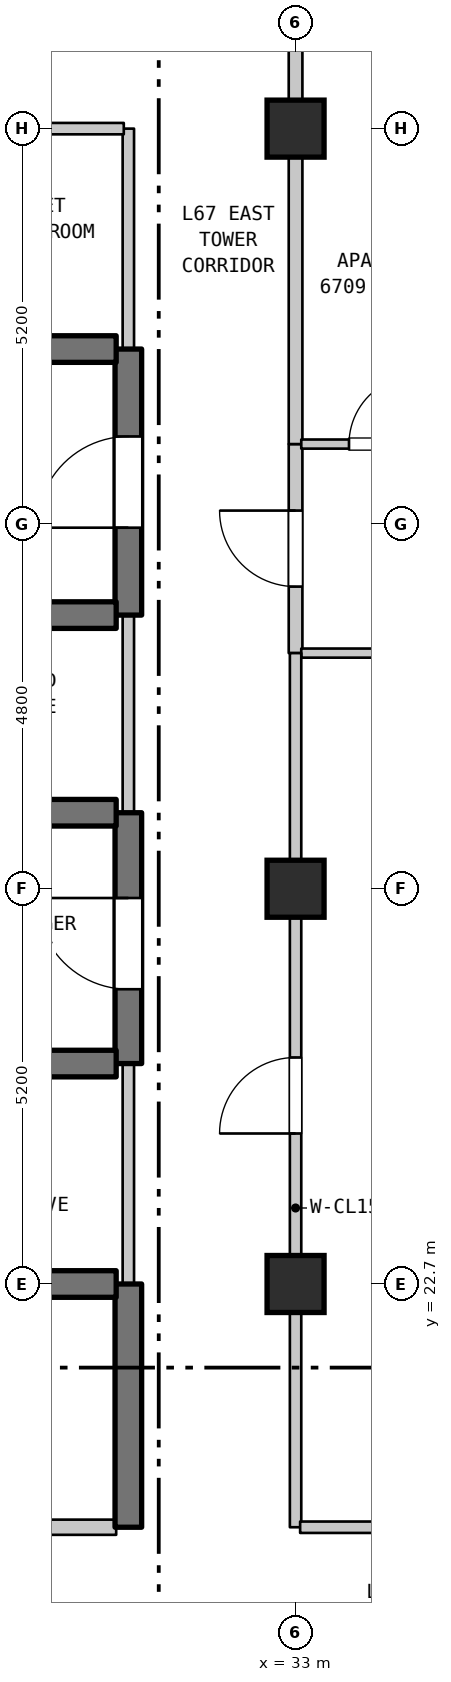
"""IFC4 building model, lengths in metres.
Left out: names, types, materials, properties, quantities, classifications, styles, units other than length and angle.
Written with IfcOpenShell. Run it as: python <this file> out.ifc"""

import sys

from ifc_helpers import new_model, si_unit, direction, frame, frame_2d, origin, origin_2d, place, context, subcontext, project, spatial, rectangle, extrude, element, fill, save


model = new_model("IFC4")
c1 = context("Model", 3, precision=1e-05, world=origin(), true_north=direction((0.0, 1.0)))
c2 = subcontext(c1, "Body", "Model", "MODEL_VIEW")
j1 = project(units=[si_unit("LENGTHUNIT", "METRE"), si_unit("PLANEANGLEUNIT", "RADIAN")], contexts=[c1])
p1 = place(None, origin())
s1 = spatial("IfcSite", under=j1, at=p1, CompositionType="ELEMENT")
p2 = place(p1, origin())
s2 = spatial("IfcBuilding", under=s1, at=p2, CompositionType="ELEMENT")
p3 = place(p2, frame((0.0, 0.0, 269.5)))
s3 = spatial("IfcBuildingStorey", under=s2, at=p3, CompositionType="ELEMENT", Elevation=269.5)
for number, where, z_axis, x_axis in (
    (1, (33.0, 22.7, 0.0), (0.0, 0.0, 1.0), (1.0, 0.0, 0.0)),
    (2, (33.0, 27.9, 0.0), (0.0, 0.0, 1.0), (1.0, 0.0, 0.0)),
    (3, (33.0, 37.9, 0.0), (0.0, 0.0, 1.0), (1.0, 0.0, 0.0)),
):
    element("IfcColumn", number, at=place(p3, frame(where, z_axis=z_axis, x_axis=x_axis)), inside=s3, PredefinedType="COLUMN", context=c2, shape_type="SweptSolid", body=[
        extrude(rectangle(XDim=0.75, YDim=0.75, at=origin_2d()), origin(), (0.0, 0.0, 1.0), 3.7),
    ])
p4 = place(p3, frame((30.8, 19.5, 0.0), z_axis=(0.0, 0.0, 1.0), x_axis=(0.0, 1.0, 0.0)))
e4 = element("IfcWall", 4, at=p4, inside=s3, PredefinedType="SHEAR", context=c2, shape_type="SweptSolid", body=[
    extrude(rectangle(XDim=3.2, YDim=0.35, at=frame_2d((1.6, 0.0))), origin(), (0.0, 0.0, 1.0), 3.39),
])
p5 = place(p3, frame((30.8, 22.7, 0.0), z_axis=(0.0, 0.0, 1.0), x_axis=(0.0, 1.0, 0.0)))
e5 = element("IfcWall", 5, at=p5, inside=s3, PredefinedType="STANDARD", context=c2, shape_type="SweptSolid", body=[
    extrude(rectangle(XDim=2.9, YDim=0.15, at=frame_2d((1.45, 0.0))), origin(), (0.0, 0.0, 1.0), 3.39),
])
p6 = place(p3, frame((30.8, 25.6, 0.0), z_axis=(0.0, 0.0, 1.0), x_axis=(0.0, 1.0, 0.0)))
e6 = element("IfcWall", 6, at=p6, inside=s3, PredefinedType="SHEAR", context=c2, shape_type="SweptSolid", body=[
    extrude(rectangle(XDim=3.3, YDim=0.35, at=frame_2d((1.65, 0.0))), origin(), (0.0, 0.0, 1.0), 3.39),
])
p7 = place(p6, frame((0.978, 0.0, 0.0)))
e7 = element("IfcOpeningElement", 7, at=p7, cuts=e6, PredefinedType="OPENING", context=c2, shape_type="SweptSolid", body=[
    extrude(rectangle(XDim=1.2, YDim=2.2, at=frame_2d((0.6, 1.1))), frame((0.0, 0.185, 0.0), z_axis=(0.0, -1.0, 0.0), x_axis=(1.0, 0.0, 0.0)), (0.0, 0.0, 1.0), 0.37),
])
p8 = place(p3, frame((30.8, 28.9, 0.0), z_axis=(0.0, 0.0, 1.0), x_axis=(0.0, 1.0, 0.0)))
e8 = element("IfcWall", 8, at=p8, inside=s3, PredefinedType="STANDARD", context=c2, shape_type="SweptSolid", body=[
    extrude(rectangle(XDim=2.6, YDim=0.15, at=frame_2d((1.3, 0.0))), origin(), (0.0, 0.0, 1.0), 3.39),
])
p9 = place(p3, frame((30.8, 31.5, 0.0), z_axis=(0.0, 0.0, 1.0), x_axis=(0.0, 1.0, 0.0)))
e9 = element("IfcWall", 9, at=p9, inside=s3, PredefinedType="SHEAR", context=c2, shape_type="SweptSolid", body=[
    extrude(rectangle(XDim=3.5, YDim=0.35, at=frame_2d((1.75, 0.0))), origin(), (0.0, 0.0, 1.0), 3.39),
])
p10 = place(p9, frame((1.15, 0.0, 0.0)))
e10 = element("IfcOpeningElement", 10, at=p10, cuts=e9, PredefinedType="OPENING", context=c2, shape_type="SweptSolid", body=[
    extrude(rectangle(XDim=1.2, YDim=2.2, at=frame_2d((0.6, 1.1))), frame((0.0, 0.185, 0.0), z_axis=(0.0, -1.0, 0.0), x_axis=(1.0, 0.0, 0.0)), (0.0, 0.0, 1.0), 0.37),
])
p11 = place(p3, frame((30.8, 35.0, 0.0), z_axis=(0.0, 0.0, 1.0), x_axis=(0.0, 1.0, 0.0)))
e11 = element("IfcWall", 11, at=p11, inside=s3, PredefinedType="STANDARD", context=c2, shape_type="SweptSolid", body=[
    extrude(rectangle(XDim=2.9, YDim=0.15, at=frame_2d((1.45, 0.0))), origin(), (0.0, 0.0, 1.0), 3.39),
])
p12 = place(p3, frame((33.0, 19.5, 0.0), z_axis=(0.0, 0.0, 1.0), x_axis=(0.0, 1.0, 0.0)))
e12 = element("IfcWall", 12, at=p12, inside=s3, PredefinedType="STANDARD", context=c2, shape_type="SweptSolid", body=[
    extrude(rectangle(XDim=8.4, YDim=0.15, at=frame_2d((4.2, 0.0))), origin(), (0.0, 0.0, 1.0), 3.1),
])
p13 = place(p12, frame((5.18, 0.0, 0.0)))
e13 = element("IfcOpeningElement", 13, at=p13, cuts=e12, PredefinedType="OPENING", context=c2, shape_type="SweptSolid", body=[
    extrude(rectangle(XDim=1.0, YDim=2.15, at=frame_2d((0.5, 1.075))), frame((0.0, 0.085, 0.0), z_axis=(0.0, -1.0, 0.0), x_axis=(1.0, 0.0, 0.0)), (0.0, 0.0, 1.0), 0.17),
])
p14 = place(p3, frame((33.0, 31.0, 0.0), z_axis=(0.0, 0.0, 1.0), x_axis=(0.0, 1.0, 0.0)))
e14 = element("IfcWall", 14, at=p14, inside=s3, PredefinedType="STANDARD", context=c2, shape_type="SweptSolid", body=[
    extrude(rectangle(XDim=2.75, YDim=0.18, at=frame_2d((1.375, 0.0))), origin(), (0.0, 0.0, 1.0), 2.89),
])
p15 = place(p14, frame((0.875, 0.0, 0.0)))
e15 = element("IfcOpeningElement", 15, at=p15, cuts=e14, PredefinedType="OPENING", context=c2, shape_type="SweptSolid", body=[
    extrude(rectangle(XDim=1.0, YDim=2.15, at=frame_2d((0.5, 1.075))), frame((0.0, 0.1, 0.0), z_axis=(0.0, -1.0, 0.0), x_axis=(1.0, 0.0, 0.0)), (0.0, 0.0, 1.0), 0.2),
])
p16 = place(p3, frame((33.0, 33.75, 0.0), z_axis=(0.0, 0.0, 1.0), x_axis=(0.0, 1.0, 0.0)))
e16 = element("IfcWall", 16, at=p16, inside=s3, PredefinedType="STANDARD", context=c2, shape_type="SweptSolid", body=[
    extrude(rectangle(XDim=4.15, YDim=0.18, at=frame_2d((2.075, 0.0))), origin(), (0.0, 0.0, 1.0), 2.89),
])
p17 = place(p3, frame((25.985, 19.5, 0.0), z_axis=(0.0, 0.0, 1.0), x_axis=(1.0, 0.0, 0.0)))
e17 = element("IfcWall", 17, at=p17, inside=s3, PredefinedType="STANDARD", context=c2, shape_type="SweptSolid", body=[
    extrude(rectangle(XDim=4.655, YDim=0.2, at=frame_2d((2.327, 0.0))), origin(), (0.0, 0.0, 1.0), 3.39),
])
p18 = place(p17, frame((1.845, 0.0, 0.0)))
e18 = element("IfcOpeningElement", 18, at=p18, cuts=e17, PredefinedType="OPENING", context=c2, shape_type="SweptSolid", body=[
    extrude(rectangle(XDim=0.9, YDim=2.15, at=frame_2d((0.45, 1.075))), frame((0.0, 0.11, 0.0), z_axis=(0.0, -1.0, 0.0), x_axis=(1.0, 0.0, 0.0)), (0.0, 0.0, 1.0), 0.22),
])
p19 = place(p3, frame((33.06, 19.5, 0.0), z_axis=(0.0, 0.0, 1.0), x_axis=(1.0, 0.0, 0.0)))
e19 = element("IfcWall", 19, at=p19, inside=s3, PredefinedType="STANDARD", context=c2, shape_type="SweptSolid", body=[
    extrude(rectangle(XDim=8.323, YDim=0.15, at=frame_2d((4.162, 0.0))), origin(), (0.0, 0.0, 1.0), 3.39),
])
p20 = place(p19, frame((3.583, 0.0, 0.0)))
e20 = element("IfcOpeningElement", 20, at=p20, cuts=e19, PredefinedType="OPENING", context=c2, shape_type="SweptSolid", body=[
    extrude(rectangle(XDim=1.0, YDim=2.15, at=frame_2d((0.5, 1.075))), frame((0.0, 0.085, 0.0), z_axis=(0.0, -1.0, 0.0), x_axis=(1.0, 0.0, 0.0)), (0.0, 0.0, 1.0), 0.17),
])
p21 = place(p3, frame((27.46, 22.7, 0.0), z_axis=(0.0, 0.0, 1.0), x_axis=(1.0, 0.0, 0.0)))
e21 = element("IfcWall", 21, at=p21, inside=s3, PredefinedType="SHEAR", context=c2, shape_type="SweptSolid", body=[
    extrude(rectangle(XDim=3.18, YDim=0.35, at=frame_2d((1.59, 0.0))), origin(), (0.0, 0.0, 1.0), 3.39),
])
p22 = place(p3, frame((27.46, 25.6, 0.0), z_axis=(0.0, 0.0, 1.0), x_axis=(1.0, 0.0, 0.0)))
e22 = element("IfcWall", 22, at=p22, inside=s3, PredefinedType="SHEAR", context=c2, shape_type="SweptSolid", body=[
    extrude(rectangle(XDim=3.18, YDim=0.35, at=frame_2d((1.59, 0.0))), origin(), (0.0, 0.0, 1.0), 3.39),
])
p23 = place(p22, frame((1.115, 0.0, 0.0)))
e23 = element("IfcOpeningElement", 23, at=p23, cuts=e22, PredefinedType="OPENING", context=c2, shape_type="SweptSolid", body=[
    extrude(rectangle(XDim=0.95, YDim=2.15, at=frame_2d((0.475, 1.075))), frame((0.0, 0.185, 0.0), z_axis=(0.0, -1.0, 0.0), x_axis=(1.0, 0.0, 0.0)), (0.0, 0.0, 1.0), 0.37),
])
p24 = place(p3, frame((27.46, 28.9, 0.0), z_axis=(0.0, 0.0, 1.0), x_axis=(1.0, 0.0, 0.0)))
e24 = element("IfcWall", 24, at=p24, inside=s3, PredefinedType="SHEAR", context=c2, shape_type="SweptSolid", body=[
    extrude(rectangle(XDim=3.18, YDim=0.35, at=frame_2d((1.59, 0.0))), origin(), (0.0, 0.0, 1.0), 3.39),
])
p25 = place(p24, frame((1.115, 0.0, 0.0)))
e25 = element("IfcOpeningElement", 25, at=p25, cuts=e24, PredefinedType="OPENING", context=c2, shape_type="SweptSolid", body=[
    extrude(rectangle(XDim=0.95, YDim=2.15, at=frame_2d((0.475, 1.075))), frame((0.0, 0.185, 0.0), z_axis=(0.0, -1.0, 0.0), x_axis=(1.0, 0.0, 0.0)), (0.0, 0.0, 1.0), 0.37),
])
p26 = place(p3, frame((33.075, 31.0, 0.0), z_axis=(0.0, 0.0, 1.0), x_axis=(1.0, 0.0, 0.0)))
e26 = element("IfcWall", 26, at=p26, inside=s3, PredefinedType="PARTITIONING", context=c2, shape_type="SweptSolid", body=[
    extrude(rectangle(XDim=11.199, YDim=0.12, at=frame_2d((5.6, 0.0))), origin(), (0.0, 0.0, 1.0), 3.39),
])
p27 = place(p3, frame((27.46, 31.5, 0.0), z_axis=(0.0, 0.0, 1.0), x_axis=(1.0, 0.0, 0.0)))
e27 = element("IfcWall", 27, at=p27, inside=s3, PredefinedType="SHEAR", context=c2, shape_type="SweptSolid", body=[
    extrude(rectangle(XDim=3.18, YDim=0.35, at=frame_2d((1.59, 0.0))), origin(), (0.0, 0.0, 1.0), 3.39),
])
p28 = place(p3, frame((33.075, 33.75, 0.0), z_axis=(0.0, 0.0, 1.0), x_axis=(1.0, 0.0, 0.0)))
e28 = element("IfcWall", 28, at=p28, inside=s3, PredefinedType="PARTITIONING", context=c2, shape_type="SweptSolid", body=[
    extrude(rectangle(XDim=2.335, YDim=0.12, at=frame_2d((1.167, 0.0))), origin(), (0.0, 0.0, 1.0), 3.39),
])
p29 = place(p28, frame((0.628, 0.0, 0.0)))
e29 = element("IfcOpeningElement", 29, at=p29, cuts=e28, PredefinedType="OPENING", context=c2, shape_type="SweptSolid", body=[
    extrude(rectangle(XDim=0.9, YDim=2.15, at=frame_2d((0.45, 1.075))), frame((0.0, 0.07, 0.0), z_axis=(0.0, -1.0, 0.0), x_axis=(1.0, 0.0, 0.0)), (0.0, 0.0, 1.0), 0.14),
])
p30 = place(p3, frame((26.645, 35.0, 0.0), z_axis=(0.0, 0.0, 1.0), x_axis=(1.0, 0.0, 0.0)))
e30 = element("IfcWall", 30, at=p30, inside=s3, PredefinedType="SHEAR", context=c2, shape_type="SweptSolid", body=[
    extrude(rectangle(XDim=3.995, YDim=0.35, at=frame_2d((1.998, 0.0))), origin(), (0.0, 0.0, 1.0), 3.39),
])
p31 = place(p30, frame((1.508, 0.0, 0.0)))
e31 = element("IfcOpeningElement", 31, at=p31, cuts=e30, PredefinedType="OPENING", context=c2, shape_type="SweptSolid", body=[
    extrude(rectangle(XDim=0.95, YDim=2.15, at=frame_2d((0.475, 1.075))), frame((0.0, 0.185, 0.0), z_axis=(0.0, -1.0, 0.0), x_axis=(1.0, 0.0, 0.0)), (0.0, 0.0, 1.0), 0.37),
])
p32 = place(p3, frame((26.645, 37.9, 0.0), z_axis=(0.0, 0.0, 1.0), x_axis=(1.0, 0.0, 0.0)))
e32 = element("IfcWall", 32, at=p32, inside=s3, PredefinedType="STANDARD", context=c2, shape_type="SweptSolid", body=[
    extrude(rectangle(XDim=4.095, YDim=0.15, at=frame_2d((2.047, 0.0))), origin(), (0.0, 0.0, 1.0), 2.89),
])
p33 = place(p3, frame((33.0, 27.9, 0.0), z_axis=(0.0, 0.0, 1.0), x_axis=(0.0, 1.0, 0.0)))
e33 = element("IfcWall", 33, at=p33, inside=s3, PredefinedType="STANDARD", context=c2, shape_type="SweptSolid", body=[
    extrude(rectangle(XDim=3.1, YDim=0.15, at=frame_2d((1.55, 0.0))), origin(), (0.0, 0.0, 1.0), 2.89),
])
p34 = place(p3, frame((33.0, 37.9, 0.0), z_axis=(0.0, 0.0, 1.0), x_axis=(0.0, 1.0, 0.0)))
e34 = element("IfcWall", 34, at=p34, inside=s3, PredefinedType="STANDARD", context=c2, shape_type="SweptSolid", body=[
    extrude(rectangle(XDim=2.2, YDim=0.18, at=frame_2d((1.1, 0.0))), origin(), (0.0, 0.0, 1.0), 2.79),
])
p35 = place(p7, origin())
e35 = element("IfcDoor", 35, at=p35, inside=s3, OperationType="SINGLE_SWING_RIGHT", PredefinedType="DOOR", context=c2, shape_type="SweptSolid", body=[
    extrude(rectangle(XDim=1.2, YDim=2.2, at=frame_2d((0.6, 1.1))), frame((0.0, 0.025, 0.0), z_axis=(0.0, -1.0, 0.0), x_axis=(1.0, 0.0, 0.0)), (0.0, 0.0, 1.0), 0.05),
])
fill(e7, e35)
p36 = place(p10, origin())
e36 = element("IfcDoor", 36, at=p36, inside=s3, OperationType="SINGLE_SWING_LEFT", PredefinedType="DOOR", context=c2, shape_type="SweptSolid", body=[
    extrude(rectangle(XDim=1.2, YDim=2.2, at=frame_2d((0.6, 1.1))), frame((0.0, 0.025, 0.0), z_axis=(0.0, -1.0, 0.0), x_axis=(1.0, 0.0, 0.0)), (0.0, 0.0, 1.0), 0.05),
])
fill(e10, e36)
p37 = place(p13, origin())
e37 = element("IfcDoor", 37, at=p37, inside=s3, OperationType="SINGLE_SWING_LEFT", PredefinedType="DOOR", context=c2, shape_type="SweptSolid", body=[
    extrude(rectangle(XDim=1.0, YDim=2.15, at=frame_2d((0.5, 1.075))), frame((0.0, 0.025, 0.0), z_axis=(0.0, -1.0, 0.0), x_axis=(1.0, 0.0, 0.0)), (0.0, 0.0, 1.0), 0.05),
])
fill(e13, e37)
p38 = place(p15, origin())
e38 = element("IfcDoor", 38, at=p38, inside=s3, OperationType="SINGLE_SWING_RIGHT", PredefinedType="DOOR", context=c2, shape_type="SweptSolid", body=[
    extrude(rectangle(XDim=1.0, YDim=2.15, at=frame_2d((0.5, 1.075))), frame((0.0, 0.025, 0.0), z_axis=(0.0, -1.0, 0.0), x_axis=(1.0, 0.0, 0.0)), (0.0, 0.0, 1.0), 0.05),
])
fill(e15, e38)
p39 = place(p29, origin())
e39 = element("IfcDoor", 39, at=p39, inside=s3, OperationType="SINGLE_SWING_RIGHT", PredefinedType="DOOR", context=c2, shape_type="SweptSolid", body=[
    extrude(rectangle(XDim=0.9, YDim=2.15, at=frame_2d((0.45, 1.075))), frame((0.0, 0.025, 0.0), z_axis=(0.0, -1.0, 0.0), x_axis=(1.0, 0.0, 0.0)), (0.0, 0.0, 1.0), 0.05),
])
fill(e29, e39)
save(model, sys.argv[1])
